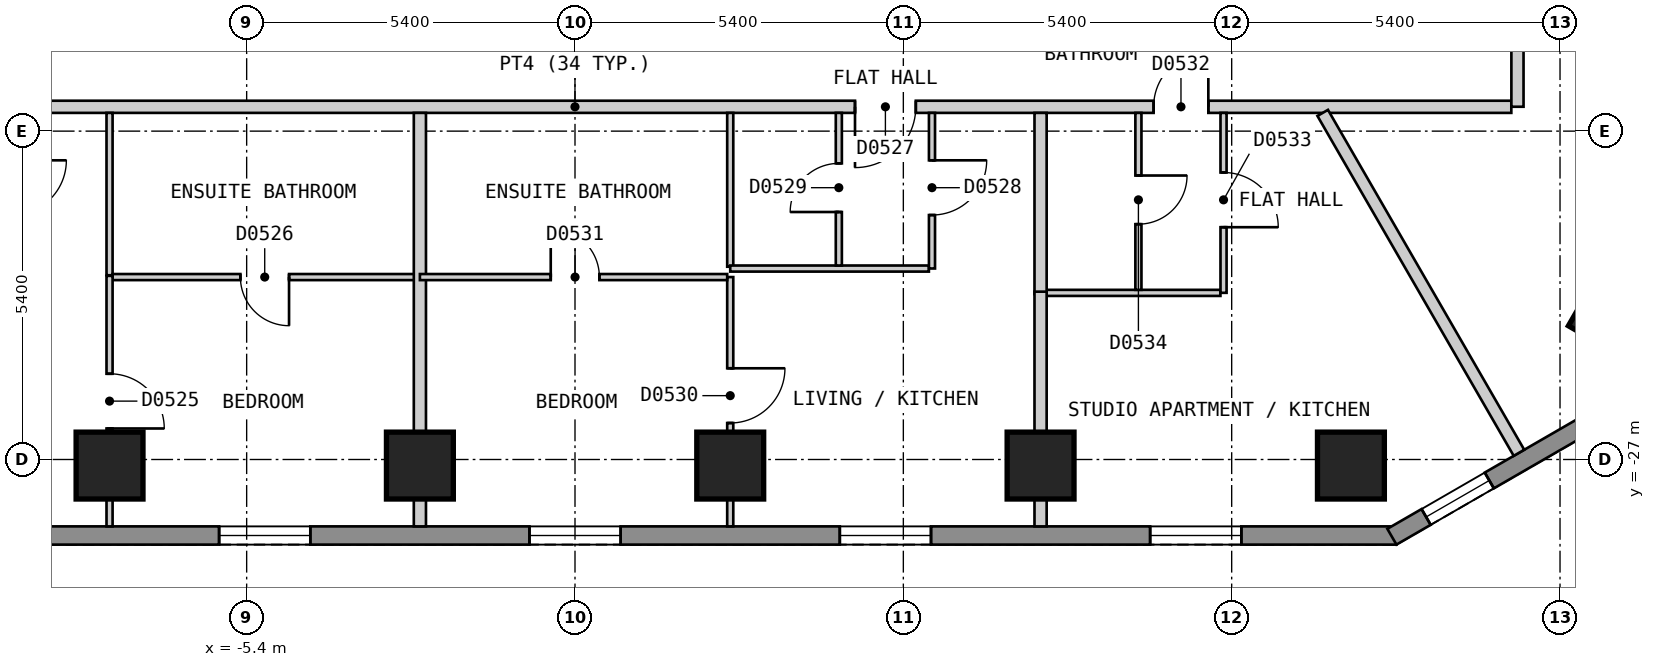
"""IFC4 building model, lengths in metres.
Left out: names, types, materials, properties, quantities, classifications, styles, units other than length and angle.
Written with IfcOpenShell. Run it as: python <this file> out.ifc"""

import sys

from ifc_helpers import new_model, si_unit, direction, frame, frame_2d, origin, origin_2d, place, context, subcontext, project, spatial, polyline, rectangle, outline, extrude, element, fill, save


model = new_model("IFC4")
c1 = context("Model", 3, precision=1e-05, world=origin(), true_north=direction((0.0, 1.0)))
c2 = subcontext(c1, "Body", "Model", "MODEL_VIEW")
j1 = project(units=[si_unit("LENGTHUNIT", "METRE"), si_unit("PLANEANGLEUNIT", "RADIAN")], contexts=[c1])
p1 = place(None, origin())
s1 = spatial("IfcSite", under=j1, at=p1, CompositionType="ELEMENT")
p2 = place(p1, origin())
s2 = spatial("IfcBuilding", under=s1, at=p2, CompositionType="ELEMENT")
p3 = place(p2, frame((0.0, 0.0, 50.4)))
s3 = spatial("IfcBuildingStorey", under=s2, at=p3, CompositionType="ELEMENT", Elevation=50.4)
for number, where, z_axis, x_axis in (
    (1, (-7.655, -27.1, 0.0), (0.0, 0.0, 1.0), (1.0, 0.0, 0.0)),
    (2, (-2.551, -27.1, 0.0), (0.0, 0.0, 1.0), (1.0, 0.0, 0.0)),
    (3, (2.553, -27.1, 0.0), (0.0, 0.0, 1.0), (1.0, 0.0, 0.0)),
    (4, (7.657, -27.1, 0.0), (0.0, 0.0, 1.0), (1.0, 0.0, 0.0)),
    (5, (12.761, -27.1, 0.0), (0.0, 0.0, 1.0), (1.0, 0.0, 0.0)),
    (6, (17.09, -24.6, 0.0), (0.0, 0.0, 1.0), (0.5, 0.866, 0.0)),
):
    element("IfcColumn", number, at=place(p3, frame(where, z_axis=z_axis, x_axis=x_axis)), inside=s3, PredefinedType="COLUMN", context=c2, shape_type="SweptSolid", body=[
        extrude(rectangle(XDim=1.1, YDim=1.1, at=origin_2d()), origin(), (0.0, 0.0, 1.0), 3.0),
    ])
p4 = place(p3, frame((-13.51, -28.25, 0.0), z_axis=(0.0, 0.0, 1.0), x_axis=(1.0, 0.0, 0.0)))
e7 = element("IfcWall", 7, at=p4, inside=s3, PredefinedType="SOLIDWALL", context=c2, shape_type="SweptSolid", body=[
    extrude(outline(polyline([(0.0, -0.15), (27.02, -0.15), (26.94, 0.15), (0.08, 0.15), (0.0, -0.15)])), origin(), (0.0, 0.0, 1.0), 2.7),
])
p5 = place(p4, frame((2.553, 0.0, 0.15)))
e8 = element("IfcOpeningElement", 8, at=p5, cuts=e7, PredefinedType="OPENING", context=c2, shape_type="SweptSolid", body=[
    extrude(rectangle(XDim=1.5, YDim=2.1, at=frame_2d((0.75, 1.05))), frame((0.0, 0.16, 0.0), z_axis=(0.0, -1.0, 0.0), x_axis=(1.0, 0.0, 0.0)), (0.0, 0.0, 1.0), 0.32),
])
p6 = place(p4, frame((7.657, 0.0, 0.15)))
e9 = element("IfcOpeningElement", 9, at=p6, cuts=e7, PredefinedType="OPENING", context=c2, shape_type="SweptSolid", body=[
    extrude(rectangle(XDim=1.5, YDim=2.1, at=frame_2d((0.75, 1.05))), frame((0.0, 0.16, 0.0), z_axis=(0.0, -1.0, 0.0), x_axis=(1.0, 0.0, 0.0)), (0.0, 0.0, 1.0), 0.32),
])
p7 = place(p4, frame((12.761, 0.0, 0.15)))
e10 = element("IfcOpeningElement", 10, at=p7, cuts=e7, PredefinedType="OPENING", context=c2, shape_type="SweptSolid", body=[
    extrude(rectangle(XDim=1.5, YDim=2.1, at=frame_2d((0.75, 1.05))), frame((0.0, 0.16, 0.0), z_axis=(0.0, -1.0, 0.0), x_axis=(1.0, 0.0, 0.0)), (0.0, 0.0, 1.0), 0.32),
])
p8 = place(p4, frame((17.865, 0.0, 0.15)))
e11 = element("IfcOpeningElement", 11, at=p8, cuts=e7, PredefinedType="OPENING", context=c2, shape_type="SweptSolid", body=[
    extrude(rectangle(XDim=1.5, YDim=2.1, at=frame_2d((0.75, 1.05))), frame((0.0, 0.16, 0.0), z_axis=(0.0, -1.0, 0.0), x_axis=(1.0, 0.0, 0.0)), (0.0, 0.0, 1.0), 0.32),
])
p9 = place(p4, frame((22.969, 0.0, 0.15)))
e12 = element("IfcOpeningElement", 12, at=p9, cuts=e7, PredefinedType="OPENING", context=c2, shape_type="SweptSolid", body=[
    extrude(rectangle(XDim=1.5, YDim=2.1, at=frame_2d((0.75, 1.05))), frame((0.0, 0.16, 0.0), z_axis=(0.0, -1.0, 0.0), x_axis=(1.0, 0.0, 0.0)), (0.0, 0.0, 1.0), 0.32),
])
p10 = place(p3, frame((13.435, -28.27, 0.0), z_axis=(0.0, 0.0, 1.0), x_axis=(0.866010750942, 0.50002537861, 0.0)))
e13 = element("IfcWall", 13, at=p10, inside=s3, PredefinedType="SOLIDWALL", context=c2, shape_type="SweptSolid", body=[
    extrude(outline(polyline([(0.0, -0.15), (5.0, -0.15), (4.919, 0.15), (0.08, 0.15), (0.0, -0.15)])), origin(), (0.0, 0.0, 1.0), 2.7),
])
p11 = place(p10, frame((0.65, 0.0, 0.15)))
e14 = element("IfcOpeningElement", 14, at=p11, cuts=e13, PredefinedType="OPENING", context=c2, shape_type="SweptSolid", body=[
    extrude(rectangle(XDim=1.2, YDim=2.1, at=frame_2d((0.6, 1.05))), frame((0.0, 0.16, 0.0), z_axis=(0.0, -1.0, 0.0), x_axis=(1.0, 0.0, 0.0)), (0.0, 0.0, 1.0), 0.32),
])
p12 = place(p3, frame((-15.4, -21.2, 0.0), z_axis=(0.0, 0.0, 1.0), x_axis=(1.0, 0.0, 0.0)))
e15 = element("IfcWall", 15, at=p12, inside=s3, PredefinedType="PARTITIONING", context=c2, shape_type="SweptSolid", body=[
    extrude(rectangle(XDim=30.799, YDim=0.2, at=frame_2d((15.399, 0.0))), origin(), (0.0, 0.0, 1.0), 2.7),
])
p13 = place(p12, frame((4.985, 0.0, 0.0)))
e16 = element("IfcOpeningElement", 16, at=p13, cuts=e15, PredefinedType="OPENING", context=c2, shape_type="SweptSolid", body=[
    extrude(rectangle(XDim=0.9, YDim=2.1, at=frame_2d((0.45, 1.05))), frame((0.0, 0.11, 0.0), z_axis=(0.0, -1.0, 0.0), x_axis=(1.0, 0.0, 0.0)), (0.0, 0.0, 1.0), 0.22),
])
p14 = place(p12, frame((20.005, 0.0, 0.0)))
e17 = element("IfcOpeningElement", 17, at=p14, cuts=e15, PredefinedType="OPENING", context=c2, shape_type="SweptSolid", body=[
    extrude(rectangle(XDim=1.0, YDim=2.1, at=frame_2d((0.5, 1.05))), frame((0.0, 0.11, 0.0), z_axis=(0.0, -1.0, 0.0), x_axis=(1.0, 0.0, 0.0)), (0.0, 0.0, 1.0), 0.22),
])
p15 = place(p12, frame((24.916, 0.0, 0.0)))
e18 = element("IfcOpeningElement", 18, at=p15, cuts=e15, PredefinedType="OPENING", context=c2, shape_type="SweptSolid", body=[
    extrude(rectangle(XDim=0.9, YDim=2.1, at=frame_2d((0.45, 1.05))), frame((0.0, 0.11, 0.0), z_axis=(0.0, -1.0, 0.0), x_axis=(1.0, 0.0, 0.0)), (0.0, 0.0, 1.0), 0.22),
])
p16 = place(p3, frame((15.5, -21.199, 0.0), z_axis=(0.0, 0.0, 1.0), x_axis=(0.0, 1.0, 0.0)))
e19 = element("IfcWall", 19, at=p16, inside=s3, PredefinedType="PARTITIONING", context=c2, shape_type="SweptSolid", body=[
    extrude(rectangle(XDim=7.575, YDim=0.2, at=frame_2d((3.788, 0.0))), origin(), (0.0, 0.0, 1.0), 2.7),
])
p17 = place(p16, frame((1.288, 0.0, 0.0)))
e20 = element("IfcOpeningElement", 20, at=p17, cuts=e19, PredefinedType="OPENING", context=c2, shape_type="SweptSolid", body=[
    extrude(rectangle(XDim=0.8, YDim=2.1, at=frame_2d((0.4, 1.05))), frame((0.0, 0.11, 0.0), z_axis=(0.0, -1.0, 0.0), x_axis=(1.0, 0.0, 0.0)), (0.0, 0.0, 1.0), 0.22),
])
p18 = place(p3, frame((-7.655, -21.3, 0.0), z_axis=(0.0, 0.0, 1.0), x_axis=(0.0, -1.0, 0.0)))
e21 = element("IfcWall", 21, at=p18, inside=s3, PredefinedType="PARTITIONING", context=c2, shape_type="SweptSolid", body=[
    extrude(rectangle(XDim=2.67, YDim=0.1, at=frame_2d((1.335, 0.0))), origin(), (0.0, 0.0, 1.0), 2.7),
])
p19 = place(p3, frame((2.553, -21.3, 0.0), z_axis=(0.0, 0.0, 1.0), x_axis=(0.0, -1.0, 0.0)))
e22 = element("IfcWall", 22, at=p19, inside=s3, PredefinedType="PARTITIONING", context=c2, shape_type="SweptSolid", body=[
    extrude(rectangle(XDim=2.53, YDim=0.1, at=frame_2d((1.265, 0.0))), origin(), (0.0, 0.0, 1.0), 2.7),
])
p20 = place(p3, frame((2.553, -23.86, 0.0), z_axis=(0.0, 0.0, 1.0), x_axis=(1.0, 0.0, 0.0)))
e23 = element("IfcWall", 23, at=p20, inside=s3, PredefinedType="PARTITIONING", context=c2, shape_type="SweptSolid", body=[
    extrude(rectangle(XDim=3.267, YDim=0.1, at=frame_2d((1.634, 0.0))), origin(), (0.0, 0.0, 1.0), 2.7),
])
p21 = place(p3, frame((-7.605, -24.0, 0.0), z_axis=(0.0, 0.0, 1.0), x_axis=(1.0, 0.0, 0.0)))
e24 = element("IfcWall", 24, at=p21, inside=s3, PredefinedType="PARTITIONING", context=c2, shape_type="SweptSolid", body=[
    extrude(rectangle(XDim=5.054, YDim=0.1, at=frame_2d((2.527, 0.0))), origin(), (0.0, 0.0, 1.0), 2.7),
])
p22 = place(p21, frame((2.102, 0.0, 0.0)))
e25 = element("IfcOpeningElement", 25, at=p22, cuts=e24, PredefinedType="OPENING", context=c2, shape_type="SweptSolid", body=[
    extrude(rectangle(XDim=0.8, YDim=2.1, at=frame_2d((0.4, 1.05))), frame((0.0, 0.06, 0.0), z_axis=(0.0, -1.0, 0.0), x_axis=(1.0, 0.0, 0.0)), (0.0, 0.0, 1.0), 0.12),
])
p23 = place(p3, frame((7.757, -24.26, 0.0), z_axis=(0.0, 0.0, 1.0), x_axis=(1.0, 0.0, 0.0)))
e26 = element("IfcWall", 26, at=p23, inside=s3, PredefinedType="PARTITIONING", context=c2, shape_type="SweptSolid", body=[
    extrude(rectangle(XDim=2.858, YDim=0.1, at=frame_2d((1.429, 0.0))), origin(), (0.0, 0.0, 1.0), 2.7),
])
p24 = place(p3, frame((4.339, -23.81, 0.0), z_axis=(0.0, 0.0, 1.0), x_axis=(0.0, 1.0, 0.0)))
e27 = element("IfcWall", 27, at=p24, inside=s3, PredefinedType="PARTITIONING", context=c2, shape_type="SweptSolid", body=[
    extrude(rectangle(XDim=2.51, YDim=0.1, at=frame_2d((1.255, 0.0))), origin(), (0.0, 0.0, 1.0), 2.7),
])
p25 = place(p24, frame((0.88, 0.0, 0.0)))
e28 = element("IfcOpeningElement", 28, at=p25, cuts=e27, PredefinedType="OPENING", context=c2, shape_type="SweptSolid", body=[
    extrude(rectangle(XDim=0.8, YDim=2.1, at=frame_2d((0.4, 1.05))), frame((0.0, 0.06, 0.0), z_axis=(0.0, -1.0, 0.0), x_axis=(1.0, 0.0, 0.0)), (0.0, 0.0, 1.0), 0.12),
])
p26 = place(p3, frame((5.871, -23.859, 0.0), z_axis=(0.0, 0.0, 1.0), x_axis=(0.0, 1.0, 0.0)))
e29 = element("IfcWall", 29, at=p26, inside=s3, PredefinedType="PARTITIONING", context=c2, shape_type="SweptSolid", body=[
    extrude(rectangle(XDim=2.559, YDim=0.1, at=frame_2d((1.279, 0.0))), origin(), (0.0, 0.0, 1.0), 2.7),
])
p27 = place(p26, frame((0.879, 0.0, 0.0)))
e30 = element("IfcOpeningElement", 30, at=p27, cuts=e29, PredefinedType="OPENING", context=c2, shape_type="SweptSolid", body=[
    extrude(rectangle(XDim=0.9, YDim=2.1, at=frame_2d((0.45, 1.05))), frame((0.0, 0.06, 0.0), z_axis=(0.0, -1.0, 0.0), x_axis=(1.0, 0.0, 0.0)), (0.0, 0.0, 1.0), 0.12),
])
p28 = place(p3, frame((9.266, -24.21, 0.0), z_axis=(0.0, 0.0, 1.0), x_axis=(0.0, 1.0, 0.0)))
e31 = element("IfcWall", 31, at=p28, inside=s3, PredefinedType="PARTITIONING", context=c2, shape_type="SweptSolid", body=[
    extrude(rectangle(XDim=2.91, YDim=0.1, at=frame_2d((1.455, 0.0))), origin(), (0.0, 0.0, 1.0), 2.7),
])
p29 = place(p28, frame((1.08, 0.0, 0.0)))
e32 = element("IfcOpeningElement", 32, at=p29, cuts=e31, PredefinedType="OPENING", context=c2, shape_type="SweptSolid", body=[
    extrude(rectangle(XDim=0.8, YDim=2.1, at=frame_2d((0.4, 1.05))), frame((0.0, 0.06, 0.0), z_axis=(0.0, -1.0, 0.0), x_axis=(1.0, 0.0, 0.0)), (0.0, 0.0, 1.0), 0.12),
])
p30 = place(p3, frame((10.666, -24.259, 0.0), z_axis=(0.0, 0.0, 1.0), x_axis=(0.0, 1.0, 0.0)))
e33 = element("IfcWall", 33, at=p30, inside=s3, PredefinedType="PARTITIONING", context=c2, shape_type="SweptSolid", body=[
    extrude(rectangle(XDim=2.959, YDim=0.1, at=frame_2d((1.479, 0.0))), origin(), (0.0, 0.0, 1.0), 2.7),
])
p31 = place(p30, frame((1.079, 0.0, 0.0)))
e34 = element("IfcOpeningElement", 34, at=p31, cuts=e33, PredefinedType="OPENING", context=c2, shape_type="SweptSolid", body=[
    extrude(rectangle(XDim=0.9, YDim=2.1, at=frame_2d((0.45, 1.05))), frame((0.0, 0.06, 0.0), z_axis=(0.0, -1.0, 0.0), x_axis=(1.0, 0.0, 0.0)), (0.0, 0.0, 1.0), 0.12),
])
p32 = place(p3, frame((2.553, -28.1, 0.0), z_axis=(0.0, 0.0, 1.0), x_axis=(0.0, 1.0, 0.0)))
e35 = element("IfcWall", 35, at=p32, inside=s3, PredefinedType="PARTITIONING", context=c2, shape_type="SweptSolid", body=[
    extrude(rectangle(XDim=4.1, YDim=0.1, at=frame_2d((2.05, 0.0))), origin(), (0.0, 0.0, 1.0), 2.7),
])
p33 = place(p32, frame((1.7, 0.0, 0.0)))
e36 = element("IfcOpeningElement", 36, at=p33, cuts=e35, PredefinedType="OPENING", context=c2, shape_type="SweptSolid", body=[
    extrude(rectangle(XDim=0.9, YDim=2.1, at=frame_2d((0.45, 1.05))), frame((0.0, 0.06, 0.0), z_axis=(0.0, -1.0, 0.0), x_axis=(1.0, 0.0, 0.0)), (0.0, 0.0, 1.0), 0.12),
])
p34 = place(p3, frame((-7.655, -28.1, 0.0), z_axis=(0.0, 0.0, 1.0), x_axis=(0.0, 1.0, 0.0)))
e37 = element("IfcWall", 37, at=p34, inside=s3, PredefinedType="PARTITIONING", context=c2, shape_type="SweptSolid", body=[
    extrude(rectangle(XDim=4.12, YDim=0.1, at=frame_2d((2.06, 0.0))), origin(), (0.0, 0.0, 1.0), 2.7),
])
p35 = place(p34, frame((1.61, 0.0, 0.0)))
e38 = element("IfcOpeningElement", 38, at=p35, cuts=e37, PredefinedType="OPENING", context=c2, shape_type="SweptSolid", body=[
    extrude(rectangle(XDim=0.9, YDim=2.1, at=frame_2d((0.45, 1.05))), frame((0.0, 0.06, 0.0), z_axis=(0.0, -1.0, 0.0), x_axis=(1.0, 0.0, 0.0)), (0.0, 0.0, 1.0), 0.12),
])
p36 = place(p3, frame((12.297, -21.3, 0.0), z_axis=(0.0, 0.0, 1.0), x_axis=(0.500056399578, -0.865992839024, 0.0)))
e39 = element("IfcWall", 39, at=p36, inside=s3, PredefinedType="PARTITIONING", context=c2, shape_type="SweptSolid", body=[
    extrude(rectangle(XDim=6.455, YDim=0.2, at=frame_2d((3.228, 0.0))), origin(), (0.0, 0.0, 1.0), 2.7),
])
p37 = place(p3, frame((7.657, -21.3, 0.0), z_axis=(0.0, 0.0, 1.0), x_axis=(0.0, -1.0, 0.0)))
e40 = element("IfcWall", 40, at=p37, inside=s3, PredefinedType="PARTITIONING", context=c2, shape_type="SweptSolid", body=[
    extrude(rectangle(XDim=2.98, YDim=0.2, at=frame_2d((1.49, 0.0))), origin(), (0.0, 0.0, 1.0), 2.7),
])
p38 = place(p3, frame((15.6, -17.846, 0.0), z_axis=(0.0, 0.0, 1.0), x_axis=(0.866071523686, -0.499920109479, 0.0)))
e41 = element("IfcWall", 41, at=p38, inside=s3, PredefinedType="PARTITIONING", context=c2, shape_type="SweptSolid", body=[
    extrude(rectangle(XDim=5.667, YDim=0.2, at=frame_2d((2.833, 0.0))), origin(), (0.0, 0.0, 1.0), 2.7),
])
p39 = place(p3, frame((7.657, -28.1, 0.0), z_axis=(0.0, 0.0, 1.0), x_axis=(0.0, 1.0, 0.0)))
e42 = element("IfcWall", 42, at=p39, inside=s3, PredefinedType="PARTITIONING", context=c2, shape_type="SweptSolid", body=[
    extrude(rectangle(XDim=3.86, YDim=0.2, at=frame_2d((1.93, 0.0))), origin(), (0.0, 0.0, 1.0), 2.7),
])
p40 = place(p3, frame((-2.551, -28.1, 0.0), z_axis=(0.0, 0.0, 1.0), x_axis=(0.0, 1.0, 0.0)))
e43 = element("IfcWall", 43, at=p40, inside=s3, PredefinedType="PARTITIONING", context=c2, shape_type="SweptSolid", body=[
    extrude(rectangle(XDim=6.8, YDim=0.2, at=frame_2d((3.4, 0.0))), origin(), (0.0, 0.0, 1.0), 2.7),
])
p41 = place(p3, frame((-2.551, -24.0, 0.0), z_axis=(0.0, 0.0, 1.0), x_axis=(1.0, 0.0, 0.0)))
e44 = element("IfcWall", 44, at=p41, inside=s3, PredefinedType="PARTITIONING", context=c2, shape_type="SweptSolid", body=[
    extrude(rectangle(XDim=5.054, YDim=0.1, at=frame_2d((2.527, 0.0))), origin(), (0.0, 0.0, 1.0), 2.7),
])
p42 = place(p41, frame((2.152, 0.0, 0.0)))
e45 = element("IfcOpeningElement", 45, at=p42, cuts=e44, PredefinedType="OPENING", context=c2, shape_type="SweptSolid", body=[
    extrude(rectangle(XDim=0.8, YDim=2.1, at=frame_2d((0.4, 1.05))), frame((0.0, 0.06, 0.0), z_axis=(0.0, -1.0, 0.0), x_axis=(1.0, 0.0, 0.0)), (0.0, 0.0, 1.0), 0.12),
])
p43 = place(p6, origin())
e46 = element("IfcWindow", 46, at=p43, inside=s3, PartitioningType="SINGLE_PANEL", PredefinedType="WINDOW", context=c2, shape_type="SweptSolid", body=[
    extrude(rectangle(XDim=1.5, YDim=2.1, at=frame_2d((0.75, 1.05))), frame((0.0, 0.03, 0.0), z_axis=(0.0, -1.0, 0.0), x_axis=(1.0, 0.0, 0.0)), (0.0, 0.0, 1.0), 0.06),
])
fill(e9, e46)
p44 = place(p7, origin())
e47 = element("IfcWindow", 47, at=p44, inside=s3, PartitioningType="SINGLE_PANEL", PredefinedType="WINDOW", context=c2, shape_type="SweptSolid", body=[
    extrude(rectangle(XDim=1.5, YDim=2.1, at=frame_2d((0.75, 1.05))), frame((0.0, 0.03, 0.0), z_axis=(0.0, -1.0, 0.0), x_axis=(1.0, 0.0, 0.0)), (0.0, 0.0, 1.0), 0.06),
])
fill(e10, e47)
p45 = place(p8, origin())
e48 = element("IfcWindow", 48, at=p45, inside=s3, PartitioningType="SINGLE_PANEL", PredefinedType="WINDOW", context=c2, shape_type="SweptSolid", body=[
    extrude(rectangle(XDim=1.5, YDim=2.1, at=frame_2d((0.75, 1.05))), frame((0.0, 0.03, 0.0), z_axis=(0.0, -1.0, 0.0), x_axis=(1.0, 0.0, 0.0)), (0.0, 0.0, 1.0), 0.06),
])
fill(e11, e48)
p46 = place(p9, origin())
e49 = element("IfcWindow", 49, at=p46, inside=s3, PartitioningType="SINGLE_PANEL", PredefinedType="WINDOW", context=c2, shape_type="SweptSolid", body=[
    extrude(rectangle(XDim=1.5, YDim=2.1, at=frame_2d((0.75, 1.05))), frame((0.0, 0.03, 0.0), z_axis=(0.0, -1.0, 0.0), x_axis=(1.0, 0.0, 0.0)), (0.0, 0.0, 1.0), 0.06),
])
fill(e12, e49)
p47 = place(p11, origin())
e50 = element("IfcWindow", 50, at=p47, inside=s3, PartitioningType="SINGLE_PANEL", PredefinedType="WINDOW", context=c2, shape_type="SweptSolid", body=[
    extrude(rectangle(XDim=1.2, YDim=2.1, at=frame_2d((0.6, 1.05))), frame((0.0, 0.03, 0.0), z_axis=(0.0, -1.0, 0.0), x_axis=(1.0, 0.0, 0.0)), (0.0, 0.0, 1.0), 0.06),
])
fill(e14, e50)
p48 = place(p35, origin())
e51 = element("IfcDoor", 51, at=p48, inside=s3, OperationType="SINGLE_SWING_LEFT", PredefinedType="DOOR", context=c2, shape_type="SweptSolid", body=[
    extrude(rectangle(XDim=0.9, YDim=2.1, at=frame_2d((0.45, 1.05))), frame((0.0, 0.025, 0.0), z_axis=(0.0, -1.0, 0.0), x_axis=(1.0, 0.0, 0.0)), (0.0, 0.0, 1.0), 0.05),
])
fill(e38, e51)
p49 = place(p22, origin())
e52 = element("IfcDoor", 52, at=p49, inside=s3, OperationType="SINGLE_SWING_RIGHT", PredefinedType="DOOR", context=c2, shape_type="SweptSolid", body=[
    extrude(rectangle(XDim=0.8, YDim=2.1, at=frame_2d((0.4, 1.05))), frame((0.0, 0.025, 0.0), z_axis=(0.0, -1.0, 0.0), x_axis=(1.0, 0.0, 0.0)), (0.0, 0.0, 1.0), 0.05),
])
fill(e25, e52)
p50 = place(p14, origin())
e53 = element("IfcDoor", 53, at=p50, inside=s3, OperationType="SINGLE_SWING_LEFT", PredefinedType="DOOR", context=c2, shape_type="SweptSolid", body=[
    extrude(rectangle(XDim=1.0, YDim=2.1, at=frame_2d((0.5, 1.05))), frame((0.0, 0.025, 0.0), z_axis=(0.0, -1.0, 0.0), x_axis=(1.0, 0.0, 0.0)), (0.0, 0.0, 1.0), 0.05),
])
fill(e17, e53)
p51 = place(p27, origin())
e54 = element("IfcDoor", 54, at=p51, inside=s3, OperationType="SINGLE_SWING_RIGHT", PredefinedType="DOOR", context=c2, shape_type="SweptSolid", body=[
    extrude(rectangle(XDim=0.9, YDim=2.1, at=frame_2d((0.45, 1.05))), frame((0.0, 0.025, 0.0), z_axis=(0.0, -1.0, 0.0), x_axis=(1.0, 0.0, 0.0)), (0.0, 0.0, 1.0), 0.05),
])
fill(e30, e54)
p52 = place(p25, origin())
e55 = element("IfcDoor", 55, at=p52, inside=s3, OperationType="SINGLE_SWING_LEFT", PredefinedType="DOOR", context=c2, shape_type="SweptSolid", body=[
    extrude(rectangle(XDim=0.8, YDim=2.1, at=frame_2d((0.4, 1.05))), frame((0.0, 0.025, 0.0), z_axis=(0.0, -1.0, 0.0), x_axis=(1.0, 0.0, 0.0)), (0.0, 0.0, 1.0), 0.05),
])
fill(e28, e55)
p53 = place(p33, origin())
e56 = element("IfcDoor", 56, at=p53, inside=s3, OperationType="SINGLE_SWING_RIGHT", PredefinedType="DOOR", context=c2, shape_type="SweptSolid", body=[
    extrude(rectangle(XDim=0.9, YDim=2.1, at=frame_2d((0.45, 1.05))), frame((0.0, 0.025, 0.0), z_axis=(0.0, -1.0, 0.0), x_axis=(1.0, 0.0, 0.0)), (0.0, 0.0, 1.0), 0.05),
])
fill(e36, e56)
p54 = place(p42, origin())
e57 = element("IfcDoor", 57, at=p54, inside=s3, OperationType="SINGLE_SWING_LEFT", PredefinedType="DOOR", context=c2, shape_type="SweptSolid", body=[
    extrude(rectangle(XDim=0.8, YDim=2.1, at=frame_2d((0.4, 1.05))), frame((0.0, 0.025, 0.0), z_axis=(0.0, -1.0, 0.0), x_axis=(1.0, 0.0, 0.0)), (0.0, 0.0, 1.0), 0.05),
])
fill(e45, e57)
p55 = place(p15, origin())
e58 = element("IfcDoor", 58, at=p55, inside=s3, OperationType="SINGLE_SWING_RIGHT", PredefinedType="DOOR", context=c2, shape_type="SweptSolid", body=[
    extrude(rectangle(XDim=0.9, YDim=2.1, at=frame_2d((0.45, 1.05))), frame((0.0, 0.025, 0.0), z_axis=(0.0, -1.0, 0.0), x_axis=(1.0, 0.0, 0.0)), (0.0, 0.0, 1.0), 0.05),
])
fill(e18, e58)
p56 = place(p31, origin())
e59 = element("IfcDoor", 59, at=p56, inside=s3, OperationType="SINGLE_SWING_LEFT", PredefinedType="DOOR", context=c2, shape_type="SweptSolid", body=[
    extrude(rectangle(XDim=0.9, YDim=2.1, at=frame_2d((0.45, 1.05))), frame((0.0, 0.025, 0.0), z_axis=(0.0, -1.0, 0.0), x_axis=(1.0, 0.0, 0.0)), (0.0, 0.0, 1.0), 0.05),
])
fill(e34, e59)
p57 = place(p29, origin())
e60 = element("IfcDoor", 60, at=p57, inside=s3, OperationType="SINGLE_SWING_RIGHT", PredefinedType="DOOR", context=c2, shape_type="SweptSolid", body=[
    extrude(rectangle(XDim=0.8, YDim=2.1, at=frame_2d((0.4, 1.05))), frame((0.0, 0.025, 0.0), z_axis=(0.0, -1.0, 0.0), x_axis=(1.0, 0.0, 0.0)), (0.0, 0.0, 1.0), 0.05),
])
fill(e32, e60)
save(model, sys.argv[1])
